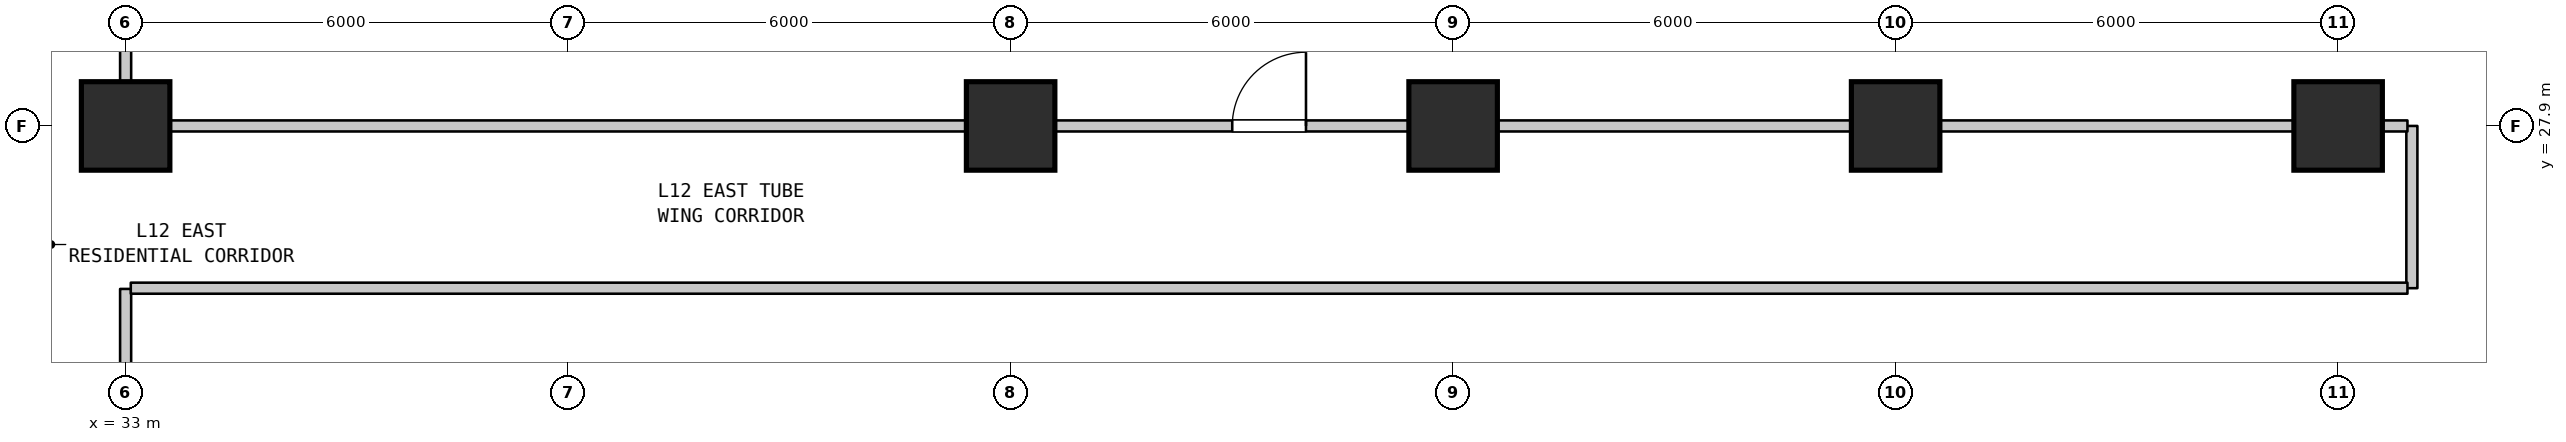
"""IFC4 building model, lengths in metres.
Left out: names, types, materials, properties, quantities, classifications, styles, units other than length and angle.
Written with IfcOpenShell. Run it as: python <this file> out.ifc"""

import sys

from ifc_helpers import new_model, si_unit, direction, frame, frame_2d, origin, origin_2d, place, context, subcontext, project, spatial, rectangle, extrude, element, fill, save


model = new_model("IFC4")
c1 = context("Model", 3, precision=1e-05, world=origin(), true_north=direction((0.0, 1.0)))
c2 = subcontext(c1, "Body", "Model", "MODEL_VIEW")
j1 = project(units=[si_unit("LENGTHUNIT", "METRE"), si_unit("PLANEANGLEUNIT", "RADIAN")], contexts=[c1])
p1 = place(None, origin())
s1 = spatial("IfcSite", under=j1, at=p1, CompositionType="ELEMENT")
p2 = place(p1, origin())
s2 = spatial("IfcBuilding", under=s1, at=p2, CompositionType="ELEMENT")
p3 = place(p2, frame((0.0, 0.0, 53.6)))
s3 = spatial("IfcBuildingStorey", under=s2, at=p3, CompositionType="ELEMENT", Elevation=53.6)
for number, where, z_axis, x_axis in (
    (1, (33.0, 27.9, 0.0), (0.0, 0.0, 1.0), (1.0, 0.0, 0.0)),
    (2, (45.0, 27.9, 0.0), (0.0, 0.0, 1.0), (1.0, 0.0, 0.0)),
    (3, (51.0, 27.9, 0.0), (0.0, 0.0, 1.0), (1.0, 0.0, 0.0)),
    (4, (57.0, 27.9, 0.0), (0.0, 0.0, 1.0), (1.0, 0.0, 0.0)),
    (5, (63.0, 27.9, 0.0), (0.0, 0.0, 1.0), (1.0, 0.0, 0.0)),
):
    element("IfcColumn", number, at=place(p3, frame(where, z_axis=z_axis, x_axis=x_axis)), inside=s3, PredefinedType="COLUMN", context=c2, shape_type="SweptSolid", body=[
        extrude(rectangle(XDim=1.2, YDim=1.2, at=origin_2d()), origin(), (0.0, 0.0, 1.0), 3.7),
    ])
p4 = place(p3, frame((33.0, 19.51, 0.0), z_axis=(0.0, 0.0, 1.0), x_axis=(0.0, 1.0, 0.0)))
e6 = element("IfcWall", 6, at=p4, inside=s3, PredefinedType="STANDARD", context=c2, shape_type="SweptSolid", body=[
    extrude(rectangle(XDim=6.18, YDim=0.15, at=frame_2d((3.09, 0.0))), origin(), (0.0, 0.0, 1.0), 2.885),
])
p5 = place(p3, frame((33.0, 27.91, 0.0), z_axis=(0.0, 0.0, 1.0), x_axis=(0.0, 1.0, 0.0)))
e7 = element("IfcWall", 7, at=p5, inside=s3, PredefinedType="STANDARD", context=c2, shape_type="SweptSolid", body=[
    extrude(rectangle(XDim=9.98, YDim=0.15, at=frame_2d((4.99, 0.0))), origin(), (0.0, 0.0, 1.0), 2.885),
])
p6 = place(p3, frame((64.0, 25.7, 0.0), z_axis=(0.0, 0.0, 1.0), x_axis=(0.0, 1.0, 0.0)))
e8 = element("IfcWall", 8, at=p6, inside=s3, PredefinedType="STANDARD", context=c2, shape_type="SweptSolid", body=[
    extrude(rectangle(XDim=2.2, YDim=0.15, at=frame_2d((1.1, 0.0))), origin(), (0.0, 0.0, 1.0), 3.385),
])
p7 = place(p3, frame((33.07, 25.7, 0.0), z_axis=(0.0, 0.0, 1.0), x_axis=(1.0, 0.0, 0.0)))
e9 = element("IfcWall", 9, at=p7, inside=s3, PredefinedType="STANDARD", context=c2, shape_type="SweptSolid", body=[
    extrude(rectangle(XDim=30.87, YDim=0.15, at=frame_2d((15.435, 0.0))), origin(), (0.0, 0.0, 1.0), 3.385),
])
p8 = place(p3, frame((33.07, 27.9, 0.0), z_axis=(0.0, 0.0, 1.0), x_axis=(1.0, 0.0, 0.0)))
e10 = element("IfcWall", 10, at=p8, inside=s3, PredefinedType="STANDARD", context=c2, shape_type="SweptSolid", body=[
    extrude(rectangle(XDim=30.87, YDim=0.15, at=frame_2d((15.435, 0.0))), origin(), (0.0, 0.0, 1.0), 2.885),
])
p9 = place(p8, frame((14.935, 0.0, 0.0)))
e11 = element("IfcOpeningElement", 11, at=p9, cuts=e10, PredefinedType="OPENING", context=c2, shape_type="SweptSolid", body=[
    extrude(rectangle(XDim=1.0, YDim=2.15, at=frame_2d((0.5, 1.075))), frame((0.0, 0.085, 0.0), z_axis=(0.0, -1.0, 0.0), x_axis=(1.0, 0.0, 0.0)), (0.0, 0.0, 1.0), 0.17),
])
p10 = place(p9, origin())
e12 = element("IfcDoor", 12, at=p10, inside=s3, OperationType="SINGLE_SWING_RIGHT", PredefinedType="DOOR", context=c2, shape_type="SweptSolid", body=[
    extrude(rectangle(XDim=1.0, YDim=2.15, at=frame_2d((0.5, 1.075))), frame((0.0, 0.025, 0.0), z_axis=(0.0, -1.0, 0.0), x_axis=(1.0, 0.0, 0.0)), (0.0, 0.0, 1.0), 0.05),
])
fill(e11, e12)
save(model, sys.argv[1])
